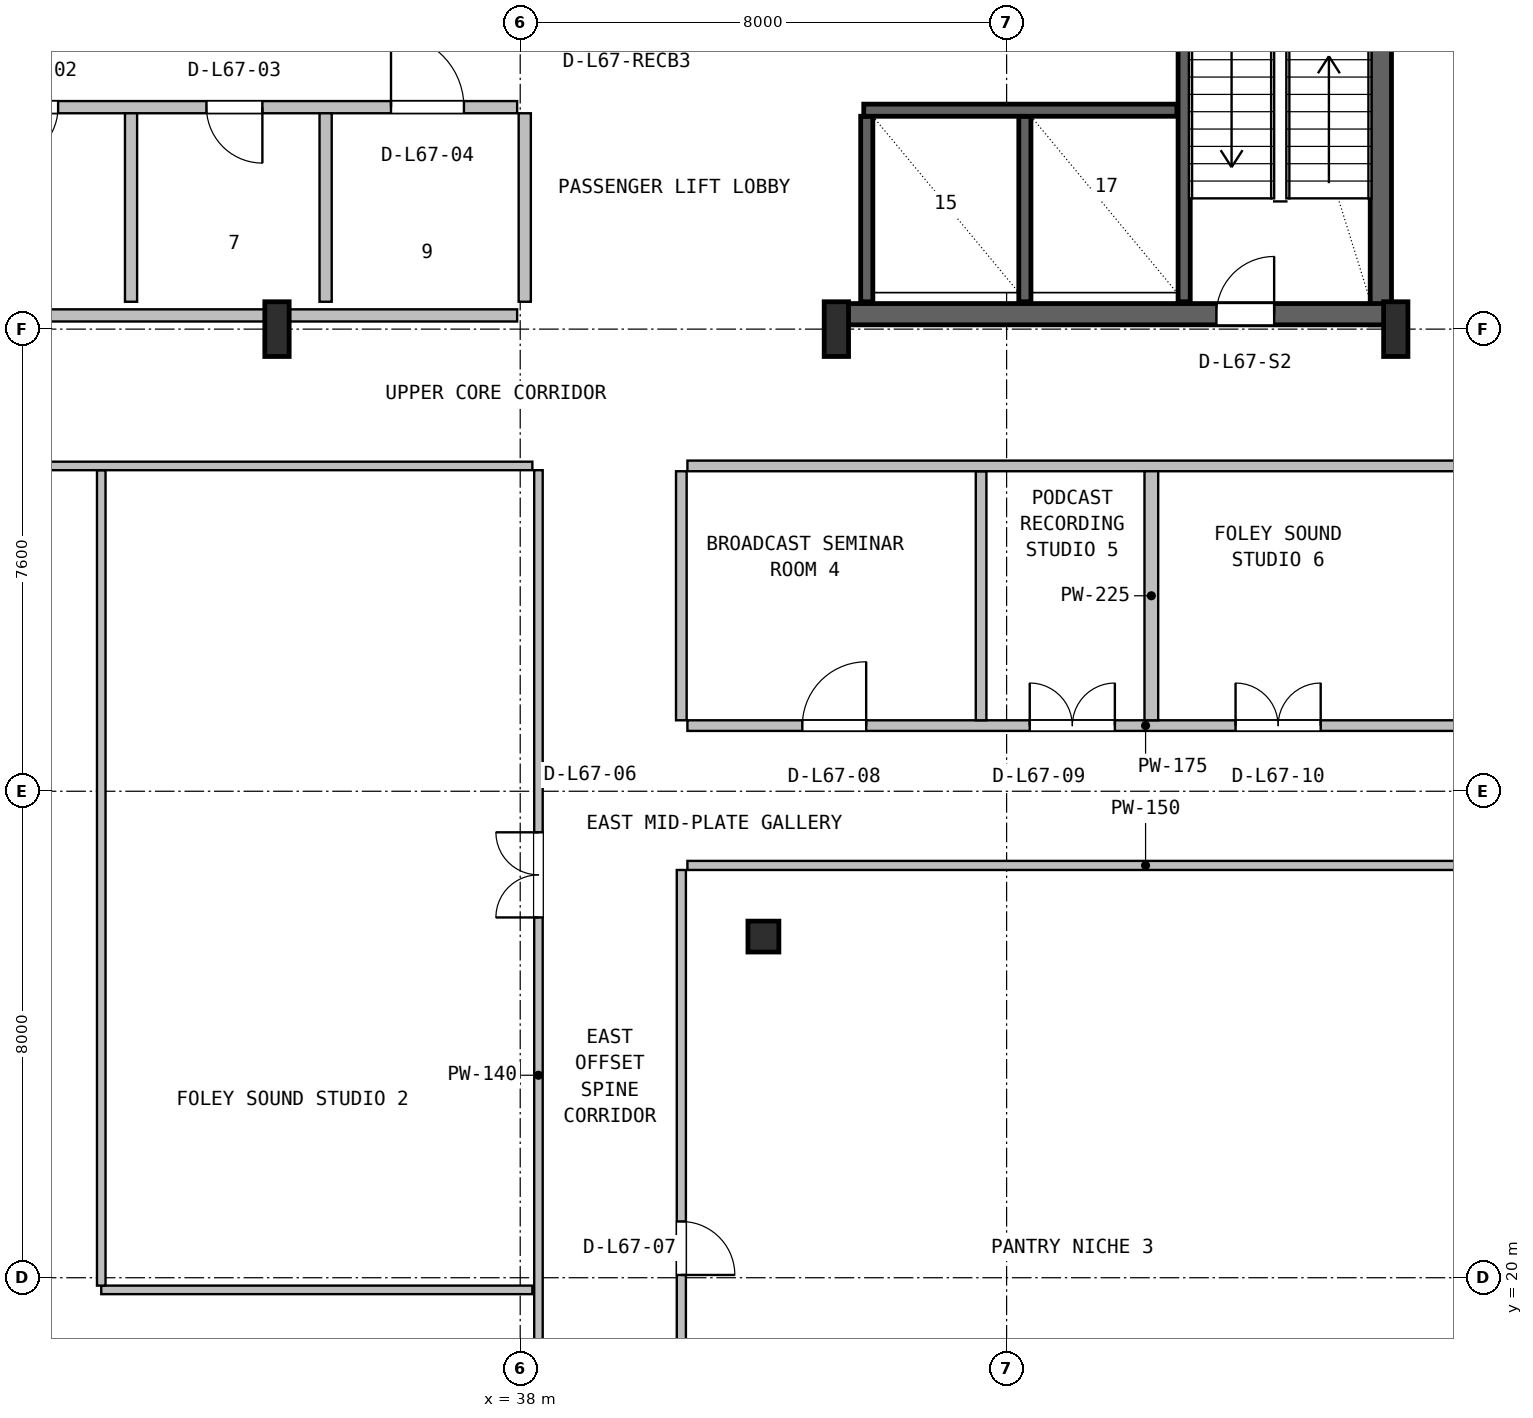
"""IFC4 building model, lengths in metres.
Left out: names, types, materials, properties, quantities, classifications, styles, units other than length and angle.
Written with IfcOpenShell. Run it as: python <this file> out.ifc"""

import sys

from ifc_helpers import new_model, si_unit, direction, frame, frame_2d, origin, origin_2d, place, context, subcontext, project, spatial, rectangle, hollow_circle, i_section, extrude, source, transform, mapped, element, fill, save


model = new_model("IFC4")
c1 = context("Model", 3, precision=1e-05, world=origin(), true_north=direction((0.0, 1.0)))
c2 = subcontext(c1, "Body", "Model", "MODEL_VIEW")
j1 = project(units=[si_unit("LENGTHUNIT", "METRE"), si_unit("PLANEANGLEUNIT", "RADIAN")], contexts=[c1])
p1 = place(None, origin())
s1 = spatial("IfcSite", under=j1, at=p1, CompositionType="ELEMENT")
p2 = place(p1, origin())
s2 = spatial("IfcBuilding", under=s1, at=p2, CompositionType="ELEMENT")
p3 = place(p2, frame((0.0, 0.0, 269.8)))
s3 = spatial("IfcBuildingStorey", under=s2, at=p3, CompositionType="ELEMENT", Elevation=269.8)
p4 = place(p3, frame((52.155, 35.67, 0.0), z_axis=(0.0, 0.0, 1.0), x_axis=(0.0, 1.0, 0.0)))
e1 = element("IfcWall", 1, at=p4, inside=s3, PredefinedType="SHEAR", context=c2, shape_type="SweptSolid", body=[
    extrude(rectangle(XDim=11.13, YDim=0.35, at=frame_2d((5.565, 0.0))), origin(), (0.0, 0.0, 1.0), 3.55),
])
p5 = place(p3, frame((43.2, 35.845, 0.0), z_axis=(0.0, 0.0, 1.0), x_axis=(1.0, 0.0, 0.0)))
e2 = element("IfcWall", 2, at=p5, inside=s3, PredefinedType="SHEAR", context=c2, shape_type="SweptSolid", body=[
    extrude(rectangle(XDim=9.13, YDim=0.35, at=frame_2d((4.565, 0.0))), origin(), (0.0, 0.0, 1.0), 3.55),
])
p6 = place(p5, frame((6.25, 0.0, 0.0)))
e3 = element("IfcOpeningElement", 3, at=p6, cuts=e2, PredefinedType="OPENING", context=c2, shape_type="SweptSolid", body=[
    extrude(rectangle(XDim=0.95, YDim=2.1, at=frame_2d((0.475, 1.05))), frame((0.0, 0.185, 0.0), z_axis=(0.0, -1.0, 0.0), x_axis=(1.0, 0.0, 0.0)), (0.0, 0.0, 1.0), 0.37),
])
m1 = source(origin(), c2, "Body", "SweptSolid", [
    extrude(i_section(OverallWidth=0.4, OverallDepth=0.9, WebThickness=0.016, FlangeThickness=0.028, FilletRadius=0.016, at=origin_2d()), origin(), (0.0, 0.0, 1.0), 3.8),
])
for number, where, z_axis, x_axis in (
    (4, (34.0, 35.6, 0.0), (0.0, 0.0, 1.0), (1.0, 0.0, 0.0)),
    (5, (43.2, 35.6, 0.0), (0.0, 0.0, 1.0), (1.0, 0.0, 0.0)),
    (6, (52.4, 35.6, 0.0), (0.0, 0.0, 1.0), (1.0, 0.0, 0.0)),
):
    element("IfcColumn", number, at=place(p3, frame(where, z_axis=z_axis, x_axis=x_axis)), inside=s3, PredefinedType="COLUMN", context=c2, shape_type="MappedRepresentation", body=[
        mapped(m1, transform((0.0, 0.0, 0.0), x_axis=(1.0, 0.0, 0.0), y_axis=(0.0, 1.0, 0.0), z_axis=(0.0, 0.0, 1.0), scale=1.0)),
    ])
m2 = source(origin(), c2, "Body", "SweptSolid", [
    extrude(hollow_circle(Radius=0.254, WallThickness=0.02, at=origin_2d()), origin(), (0.0, 0.0, 1.0), 3.8),
])
p7 = place(p3, frame((42.0, 25.61, 0.0), z_axis=(0.0, 0.0, 1.0), x_axis=(1.0, 0.0, 0.0)))
e7 = element("IfcColumn", 7, at=p7, inside=s3, PredefinedType="COLUMN", context=c2, shape_type="MappedRepresentation", body=[
    mapped(m2, transform((0.0, 0.0, 0.0), x_axis=(1.0, 0.0, 0.0), y_axis=(0.0, 1.0, 0.0), z_axis=(0.0, 0.0, 1.0), scale=1.0)),
])
p8 = place(p3, frame((48.92, 36.05, 0.0), z_axis=(0.0, 0.0, 1.0), x_axis=(0.0, 1.0, 0.0)))
e8 = element("IfcWall", 8, at=p8, inside=s3, PredefinedType="SHEAR", context=c2, shape_type="SweptSolid", body=[
    extrude(rectangle(XDim=10.5, YDim=0.2, at=frame_2d((5.25, 0.0))), origin(), (0.0, 0.0, 1.0), 3.55),
])
for number, where, z_axis, x_axis in (
    (9, (43.7, 36.05, 0.0), (0.0, 0.0, 1.0), (0.0, 1.0, 0.0)),
    (10, (46.3, 36.05, 0.0), (0.0, 0.0, 1.0), (0.0, 1.0, 0.0)),
):
    element("IfcWall", number, at=place(p3, frame(where, z_axis=z_axis, x_axis=x_axis)), inside=s3, PredefinedType="SHEAR", context=c2, shape_type="SweptSolid", body=[
        extrude(rectangle(XDim=3.05, YDim=0.2, at=frame_2d((1.525, 0.0))), origin(), (0.0, 0.0, 1.0), 3.55),
    ])
p9 = place(p3, frame((43.65, 39.2, 0.0), z_axis=(0.0, 0.0, 1.0), x_axis=(1.0, 0.0, 0.0)))
e11 = element("IfcWall", 11, at=p9, inside=s3, PredefinedType="SHEAR", context=c2, shape_type="SweptSolid", body=[
    extrude(rectangle(XDim=5.15, YDim=0.2, at=frame_2d((2.575, 0.0))), origin(), (0.0, 0.0, 1.0), 3.55),
])
p10 = place(p3, frame((25.0, 35.825, 0.0), z_axis=(0.0, 0.0, 1.0), x_axis=(1.0, 0.0, 0.0)))
e12 = element("IfcWall", 12, at=p10, inside=s3, PredefinedType="SOLIDWALL", context=c2, shape_type="SweptSolid", body=[
    extrude(rectangle(XDim=12.95, YDim=0.2, at=frame_2d((6.475, 0.0))), origin(), (0.0, 0.0, 1.0), 2.575),
])
p11 = place(p3, frame((25.0, 39.25, 0.0), z_axis=(0.0, 0.0, 1.0), x_axis=(1.0, 0.0, 0.0)))
e13 = element("IfcWall", 13, at=p11, inside=s3, PredefinedType="SOLIDWALL", context=c2, shape_type="SweptSolid", body=[
    extrude(rectangle(XDim=12.95, YDim=0.2, at=frame_2d((6.475, 0.0))), origin(), (0.0, 0.0, 1.0), 3.53),
])
p12 = place(p11, frame((1.1, 0.0, 0.0)))
e14 = element("IfcOpeningElement", 14, at=p12, cuts=e13, PredefinedType="OPENING", context=c2, shape_type="SweptSolid", body=[
    extrude(rectangle(XDim=0.9, YDim=2.06, at=frame_2d((0.45, 1.03))), frame((0.0, 0.11, 0.0), z_axis=(0.0, -1.0, 0.0), x_axis=(1.0, 0.0, 0.0)), (0.0, 0.0, 1.0), 0.22),
])
p13 = place(p11, frame((4.5, 0.0, 0.0)))
e15 = element("IfcOpeningElement", 15, at=p13, cuts=e13, PredefinedType="OPENING", context=c2, shape_type="SweptSolid", body=[
    extrude(rectangle(XDim=0.9, YDim=2.06, at=frame_2d((0.45, 1.03))), frame((0.0, 0.11, 0.0), z_axis=(0.0, -1.0, 0.0), x_axis=(1.0, 0.0, 0.0)), (0.0, 0.0, 1.0), 0.22),
])
p14 = place(p11, frame((7.84, 0.0, 0.0)))
e16 = element("IfcOpeningElement", 16, at=p14, cuts=e13, PredefinedType="OPENING", context=c2, shape_type="SweptSolid", body=[
    extrude(rectangle(XDim=0.92, YDim=2.08, at=frame_2d((0.46, 1.04))), frame((0.0, 0.11, 0.0), z_axis=(0.0, -1.0, 0.0), x_axis=(1.0, 0.0, 0.0)), (0.0, 0.0, 1.0), 0.22),
])
p15 = place(p11, frame((10.875, 0.0, 0.0)))
e17 = element("IfcOpeningElement", 17, at=p15, cuts=e13, PredefinedType="OPENING", context=c2, shape_type="SweptSolid", body=[
    extrude(rectangle(XDim=1.2, YDim=2.1, at=frame_2d((0.6, 1.05))), frame((0.0, 0.11, 0.0), z_axis=(0.0, -1.0, 0.0), x_axis=(1.0, 0.0, 0.0)), (0.0, 0.0, 1.0), 0.22),
])
p16 = place(p3, frame((31.6, 36.05, 0.0), z_axis=(0.0, 0.0, 1.0), x_axis=(0.0, 1.0, 0.0)))
e18 = element("IfcWall", 18, at=p16, inside=s3, PredefinedType="PLUMBINGWALL", context=c2, shape_type="SweptSolid", body=[
    extrude(rectangle(XDim=3.1, YDim=0.2, at=frame_2d((1.55, 0.0))), origin(), (0.0, 0.0, 1.0), 3.53),
])
for number, where, z_axis, x_axis in (
    (19, (34.8, 36.05, 0.0), (0.0, 0.0, 1.0), (0.0, 1.0, 0.0)),
    (20, (38.075, 36.05, 0.0), (0.0, 0.0, 1.0), (0.0, 1.0, 0.0)),
):
    element("IfcWall", number, at=place(p3, frame(where, z_axis=z_axis, x_axis=x_axis)), inside=s3, PredefinedType="SOLIDWALL", context=c2, shape_type="SweptSolid", body=[
        extrude(rectangle(XDim=3.1, YDim=0.2, at=frame_2d((1.55, 0.0))), origin(), (0.0, 0.0, 1.0), 3.53),
    ])
p17 = place(p3, frame((38.3, 13.38, 0.0), z_axis=(0.0, 0.0, 1.0), x_axis=(0.0, 1.0, 0.0)))
e21 = element("IfcWall", 21, at=p17, inside=s3, PredefinedType="PARTITIONING", context=c2, shape_type="SweptSolid", body=[
    extrude(rectangle(XDim=19.9, YDim=0.14, at=frame_2d((9.95, 0.0))), origin(), (0.0, 0.0, 1.0), 2.981),
])
p18 = place(p17, frame((12.545, 0.0, 0.0)))
e22 = element("IfcOpeningElement", 22, at=p18, cuts=e21, PredefinedType="OPENING", context=c2, shape_type="SweptSolid", body=[
    extrude(rectangle(XDim=1.4, YDim=2.12, at=frame_2d((0.7, 1.06))), frame((0.0, 0.08, 0.0), z_axis=(0.0, -1.0, 0.0), x_axis=(1.0, 0.0, 0.0)), (0.0, 0.0, 1.0), 0.16),
])
p19 = place(p3, frame((31.11, 19.8, 0.0), z_axis=(0.0, 0.0, 1.0), x_axis=(1.0, 0.0, 0.0)))
e23 = element("IfcWall", 23, at=p19, inside=s3, PredefinedType="PARTITIONING", context=c2, shape_type="SweptSolid", body=[
    extrude(rectangle(XDim=7.09, YDim=0.14, at=frame_2d((3.545, 0.0))), origin(), (0.0, 0.0, 1.0), 2.981),
])
p20 = place(p3, frame((31.11, 19.87, 0.0), z_axis=(0.0, 0.0, 1.0), x_axis=(0.0, 1.0, 0.0)))
e24 = element("IfcWall", 24, at=p20, inside=s3, PredefinedType="PARTITIONING", context=c2, shape_type="SweptSolid", body=[
    extrude(rectangle(XDim=13.41, YDim=0.14, at=frame_2d((6.705, 0.0))), origin(), (0.0, 0.0, 1.0), 2.981),
])
p21 = place(p3, frame((12.18, 33.35, 0.0), z_axis=(0.0, 0.0, 1.0), x_axis=(1.0, 0.0, 0.0)))
e25 = element("IfcWall", 25, at=p21, inside=s3, PredefinedType="PARTITIONING", context=c2, shape_type="SweptSolid", body=[
    extrude(rectangle(XDim=26.02, YDim=0.14, at=frame_2d((13.01, 0.0))), origin(), (0.0, 0.0, 1.0), 2.981),
])
p22 = place(p21, frame((10.7, 0.0, 0.0)))
e26 = element("IfcOpeningElement", 26, at=p22, cuts=e25, PredefinedType="OPENING", context=c2, shape_type="SweptSolid", body=[
    extrude(rectangle(XDim=1.0, YDim=2.1, at=frame_2d((0.5, 1.05))), frame((0.0, 0.08, 0.0), z_axis=(0.0, -1.0, 0.0), x_axis=(1.0, 0.0, 0.0)), (0.0, 0.0, 1.0), 0.16),
])
p23 = place(p3, frame((40.75, 26.78, 0.0), z_axis=(0.0, 0.0, 1.0), x_axis=(1.0, 0.0, 0.0)))
e27 = element("IfcWall", 27, at=p23, inside=s3, PredefinedType="PARTITIONING", context=c2, shape_type="SweptSolid", body=[
    extrude(rectangle(XDim=15.07, YDim=0.15, at=frame_2d((7.535, 0.0))), origin(), (0.0, 0.0, 1.0), 2.981),
])
p24 = place(p3, frame((40.65, 13.38, 0.0), z_axis=(0.0, 0.0, 1.0), x_axis=(0.0, 1.0, 0.0)))
e28 = element("IfcWall", 28, at=p24, inside=s3, PredefinedType="PARTITIONING", context=c2, shape_type="SweptSolid", body=[
    extrude(rectangle(XDim=13.325, YDim=0.15, at=frame_2d((6.663, 0.0))), origin(), (0.0, 0.0, 1.0), 2.981),
])
p25 = place(p24, frame((6.665, 0.0, 0.0)))
e29 = element("IfcOpeningElement", 29, at=p25, cuts=e28, PredefinedType="OPENING", context=c2, shape_type="SweptSolid", body=[
    extrude(rectangle(XDim=0.88, YDim=2.06, at=frame_2d((0.44, 1.03))), frame((0.0, 0.085, 0.0), z_axis=(0.0, -1.0, 0.0), x_axis=(1.0, 0.0, 0.0)), (0.0, 0.0, 1.0), 0.17),
])
p26 = place(p3, frame((40.75, 29.08, 0.0), z_axis=(0.0, 0.0, 1.0), x_axis=(1.0, 0.0, 0.0)))
e30 = element("IfcWall", 30, at=p26, inside=s3, PredefinedType="PARTITIONING", context=c2, shape_type="SweptSolid", body=[
    extrude(rectangle(XDim=15.07, YDim=0.175, at=frame_2d((7.535, 0.0))), origin(), (0.0, 0.0, 1.0), 2.981),
])
p27 = place(p26, frame((1.89, 0.0, 0.0)))
e31 = element("IfcOpeningElement", 31, at=p27, cuts=e30, PredefinedType="OPENING", context=c2, shape_type="SweptSolid", body=[
    extrude(rectangle(XDim=1.05, YDim=2.1, at=frame_2d((0.525, 1.05))), frame((0.0, 0.098, 0.0), z_axis=(0.0, -1.0, 0.0), x_axis=(1.0, 0.0, 0.0)), (0.0, 0.0, 1.0), 0.195),
])
p28 = place(p26, frame((5.63, 0.0, 0.0)))
e32 = element("IfcOpeningElement", 32, at=p28, cuts=e30, PredefinedType="OPENING", context=c2, shape_type="SweptSolid", body=[
    extrude(rectangle(XDim=1.4, YDim=2.12, at=frame_2d((0.7, 1.06))), frame((0.0, 0.098, 0.0), z_axis=(0.0, -1.0, 0.0), x_axis=(1.0, 0.0, 0.0)), (0.0, 0.0, 1.0), 0.195),
])
p29 = place(p26, frame((9.015, 0.0, 0.0)))
e33 = element("IfcOpeningElement", 33, at=p29, cuts=e30, PredefinedType="OPENING", context=c2, shape_type="SweptSolid", body=[
    extrude(rectangle(XDim=1.4, YDim=2.12, at=frame_2d((0.7, 1.06))), frame((0.0, 0.098, 0.0), z_axis=(0.0, -1.0, 0.0), x_axis=(1.0, 0.0, 0.0)), (0.0, 0.0, 1.0), 0.195),
])
p30 = place(p3, frame((45.58, 29.167, 0.0), z_axis=(0.0, 0.0, 1.0), x_axis=(0.0, 1.0, 0.0)))
e34 = element("IfcWall", 34, at=p30, inside=s3, PredefinedType="PARTITIONING", context=c2, shape_type="SweptSolid", body=[
    extrude(rectangle(XDim=4.096, YDim=0.175, at=frame_2d((2.048, 0.0))), origin(), (0.0, 0.0, 1.0), 3.53),
])
p31 = place(p3, frame((40.75, 33.35, 0.0), z_axis=(0.0, 0.0, 1.0), x_axis=(1.0, 0.0, 0.0)))
e35 = element("IfcWall", 35, at=p31, inside=s3, PredefinedType="PARTITIONING", context=c2, shape_type="SweptSolid", body=[
    extrude(rectangle(XDim=15.07, YDim=0.175, at=frame_2d((7.535, 0.0))), origin(), (0.0, 0.0, 1.0), 2.981),
])
p32 = place(p3, frame((40.65, 29.167, 0.0), z_axis=(0.0, 0.0, 1.0), x_axis=(0.0, 1.0, 0.0)))
e36 = element("IfcWall", 36, at=p32, inside=s3, PredefinedType="PARTITIONING", context=c2, shape_type="SweptSolid", body=[
    extrude(rectangle(XDim=4.096, YDim=0.175, at=frame_2d((2.048, 0.0))), origin(), (0.0, 0.0, 1.0), 3.53),
])
p33 = place(p3, frame((48.38, 29.167, 0.0), z_axis=(0.0, 0.0, 1.0), x_axis=(0.0, 1.0, 0.0)))
e37 = element("IfcWall", 37, at=p33, inside=s3, PredefinedType="PARTITIONING", context=c2, shape_type="SweptSolid", body=[
    extrude(rectangle(XDim=4.096, YDim=0.225, at=frame_2d((2.048, 0.0))), origin(), (0.0, 0.0, 1.0), 3.53),
])
m3 = source(origin(), c2, "Body", "SweptSolid", [
    extrude(rectangle(XDim=0.95, YDim=2.1, at=frame_2d((0.475, 1.05))), frame((0.0, 0.025, 0.0), z_axis=(0.0, -1.0, 0.0), x_axis=(1.0, 0.0, 0.0)), (0.0, 0.0, 1.0), 0.05),
])
p34 = place(p6, origin())
e38 = element("IfcDoor", 38, at=p34, inside=s3, OperationType="SINGLE_SWING_RIGHT", PredefinedType="DOOR", context=c2, shape_type="MappedRepresentation", body=[
    mapped(m3, transform((0.0, 0.0, 0.0), x_axis=(1.0, 0.0, 0.0), y_axis=(0.0, 1.0, 0.0), z_axis=(0.0, 0.0, 1.0), scale=1.0)),
])
fill(e3, e38)
m4 = source(origin(), c2, "Body", "SweptSolid", [
    extrude(rectangle(XDim=0.9, YDim=2.06, at=frame_2d((0.45, 1.03))), frame((0.0, 0.025, 0.0), z_axis=(0.0, -1.0, 0.0), x_axis=(1.0, 0.0, 0.0)), (0.0, 0.0, 1.0), 0.05),
])
p35 = place(p13, frame((0.9, 0.0, 0.0), z_axis=(0.0, 0.0, 1.0), x_axis=(-1.0, 0.0, 0.0)))
e39 = element("IfcDoor", 39, at=p35, inside=s3, OperationType="SINGLE_SWING_LEFT", PredefinedType="DOOR", context=c2, shape_type="MappedRepresentation", body=[
    mapped(m4, transform((0.0, 0.0, 0.0), x_axis=(1.0, 0.0, 0.0), y_axis=(0.0, 1.0, 0.0), z_axis=(0.0, 0.0, 1.0), scale=1.0)),
])
fill(e15, e39)
m5 = source(origin(), c2, "Body", "SweptSolid", [
    extrude(rectangle(XDim=0.92, YDim=2.08, at=frame_2d((0.46, 1.04))), frame((0.0, 0.025, 0.0), z_axis=(0.0, -1.0, 0.0), x_axis=(1.0, 0.0, 0.0)), (0.0, 0.0, 1.0), 0.05),
])
p36 = place(p14, frame((0.92, 0.0, 0.0), z_axis=(0.0, 0.0, 1.0), x_axis=(-1.0, 0.0, 0.0)))
e40 = element("IfcDoor", 40, at=p36, inside=s3, OperationType="SINGLE_SWING_RIGHT", PredefinedType="DOOR", context=c2, shape_type="MappedRepresentation", body=[
    mapped(m5, transform((0.0, 0.0, 0.0), x_axis=(1.0, 0.0, 0.0), y_axis=(0.0, 1.0, 0.0), z_axis=(0.0, 0.0, 1.0), scale=1.0)),
])
fill(e16, e40)
m6 = source(origin(), c2, "Body", "SweptSolid", [
    extrude(rectangle(XDim=1.2, YDim=2.1, at=frame_2d((0.6, 1.05))), frame((0.0, 0.025, 0.0), z_axis=(0.0, -1.0, 0.0), x_axis=(1.0, 0.0, 0.0)), (0.0, 0.0, 1.0), 0.05),
])
p37 = place(p15, origin())
e41 = element("IfcDoor", 41, at=p37, inside=s3, OperationType="SINGLE_SWING_LEFT", PredefinedType="DOOR", context=c2, shape_type="MappedRepresentation", body=[
    mapped(m6, transform((0.0, 0.0, 0.0), x_axis=(1.0, 0.0, 0.0), y_axis=(0.0, 1.0, 0.0), z_axis=(0.0, 0.0, 1.0), scale=1.0)),
])
fill(e17, e41)
m7 = source(origin(), c2, "Body", "SweptSolid", [
    extrude(rectangle(XDim=1.4, YDim=2.12, at=frame_2d((0.7, 1.06))), frame((0.0, 0.025, 0.0), z_axis=(0.0, -1.0, 0.0), x_axis=(1.0, 0.0, 0.0)), (0.0, 0.0, 1.0), 0.05),
])
p38 = place(p18, origin())
e42 = element("IfcDoor", 42, at=p38, inside=s3, OperationType="DOUBLE_DOOR_SINGLE_SWING", PredefinedType="DOOR", context=c2, shape_type="MappedRepresentation", body=[
    mapped(m7, transform((0.0, 0.0, 0.0), x_axis=(1.0, 0.0, 0.0), y_axis=(0.0, 1.0, 0.0), z_axis=(0.0, 0.0, 1.0), scale=1.0)),
])
fill(e22, e42)
m8 = source(origin(), c2, "Body", "SweptSolid", [
    extrude(rectangle(XDim=0.88, YDim=2.06, at=frame_2d((0.44, 1.03))), frame((0.0, 0.025, 0.0), z_axis=(0.0, -1.0, 0.0), x_axis=(1.0, 0.0, 0.0)), (0.0, 0.0, 1.0), 0.05),
])
p39 = place(p25, frame((0.88, 0.0, 0.0), z_axis=(0.0, 0.0, 1.0), x_axis=(-1.0, 0.0, 0.0)))
e43 = element("IfcDoor", 43, at=p39, inside=s3, OperationType="SINGLE_SWING_LEFT", PredefinedType="DOOR", context=c2, shape_type="MappedRepresentation", body=[
    mapped(m8, transform((0.0, 0.0, 0.0), x_axis=(1.0, 0.0, 0.0), y_axis=(0.0, 1.0, 0.0), z_axis=(0.0, 0.0, 1.0), scale=1.0)),
])
fill(e29, e43)
m9 = source(origin(), c2, "Body", "SweptSolid", [
    extrude(rectangle(XDim=1.05, YDim=2.1, at=frame_2d((0.525, 1.05))), frame((0.0, 0.025, 0.0), z_axis=(0.0, -1.0, 0.0), x_axis=(1.0, 0.0, 0.0)), (0.0, 0.0, 1.0), 0.05),
])
p40 = place(p27, origin())
e44 = element("IfcDoor", 44, at=p40, inside=s3, OperationType="SINGLE_SWING_RIGHT", PredefinedType="DOOR", context=c2, shape_type="MappedRepresentation", body=[
    mapped(m9, transform((0.0, 0.0, 0.0), x_axis=(1.0, 0.0, 0.0), y_axis=(0.0, 1.0, 0.0), z_axis=(0.0, 0.0, 1.0), scale=1.0)),
])
fill(e31, e44)
p41 = place(p28, origin())
e45 = element("IfcDoor", 45, at=p41, inside=s3, OperationType="DOUBLE_DOOR_SINGLE_SWING", PredefinedType="DOOR", context=c2, shape_type="MappedRepresentation", body=[
    mapped(m7, transform((0.0, 0.0, 0.0), x_axis=(1.0, 0.0, 0.0), y_axis=(0.0, 1.0, 0.0), z_axis=(0.0, 0.0, 1.0), scale=1.0)),
])
fill(e32, e45)
p42 = place(p29, origin())
e46 = element("IfcDoor", 46, at=p42, inside=s3, OperationType="DOUBLE_DOOR_SINGLE_SWING", PredefinedType="DOOR", context=c2, shape_type="MappedRepresentation", body=[
    mapped(m7, transform((0.0, 0.0, 0.0), x_axis=(1.0, 0.0, 0.0), y_axis=(0.0, 1.0, 0.0), z_axis=(0.0, 0.0, 1.0), scale=1.0)),
])
fill(e33, e46)
save(model, sys.argv[1])
